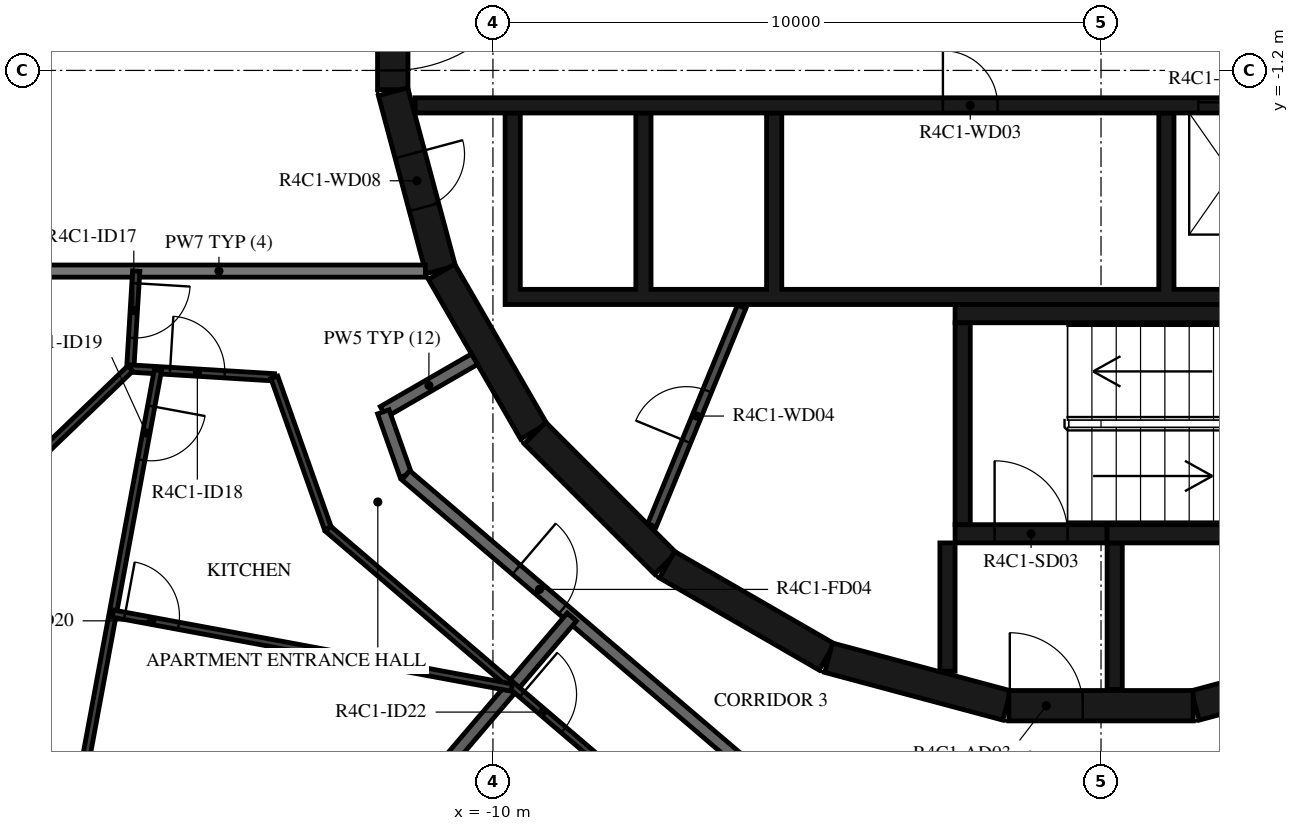
"""IFC4 building model, lengths in metres.
Left out: names, types, materials, properties, quantities, classifications, styles, units other than length and angle.
Written with IfcOpenShell. Run it as: python <this file> out.ifc"""

import sys

from ifc_helpers import new_model, si_unit, direction, frame, frame_2d, origin, place, context, subcontext, project, spatial, polyline, rectangle, outline, extrude, element, fill, save


model = new_model("IFC4")
c1 = context("Model", 3, precision=1e-05, world=origin(), true_north=direction((0.0, 1.0)))
c2 = subcontext(c1, "Body", "Model", "MODEL_VIEW")
j1 = project(units=[si_unit("LENGTHUNIT", "METRE"), si_unit("PLANEANGLEUNIT", "RADIAN")], contexts=[c1])
p1 = place(None, origin())
s1 = spatial("IfcSite", under=j1, at=p1, CompositionType="ELEMENT")
p2 = place(p1, origin())
s2 = spatial("IfcBuilding", under=s1, at=p2, CompositionType="ELEMENT")
p3 = place(p2, frame((0.0, 0.0, 176.2)))
s3 = spatial("IfcBuildingStorey", under=s2, at=p3, CompositionType="ELEMENT", Elevation=176.2)
p4 = place(p3, frame((1.55, -11.643, 0.0), z_axis=(0.0, 0.0, 1.0), x_axis=(0.965948410781, 0.258734743916, 0.0)))
e1 = element("IfcWall", 1, at=p4, inside=s3, PredefinedType="SHEAR", context=c2, shape_type="SweptSolid", body=[
    extrude(rectangle(XDim=3.033, YDim=0.5, at=frame_2d((1.516, 0.0))), origin(), (0.0, 0.0, 1.0), 3.12),
])
p5 = place(p3, frame((-11.647, 1.516, 0.0), z_axis=(0.0, 0.0, 1.0), x_axis=(0.0, -1.0, 0.0)))
e2 = element("IfcWall", 2, at=p5, inside=s3, PredefinedType="SHEAR", context=c2, shape_type="SweptSolid", body=[
    extrude(rectangle(XDim=3.033, YDim=0.5, at=frame_2d((1.516, 0.0))), origin(), (0.0, 0.0, 1.0), 3.12),
])
p6 = place(p5, frame((0.316, 0.0, 0.0)))
e3 = element("IfcOpeningElement", 3, at=p6, cuts=e2, PredefinedType="OPENING", context=c2, shape_type="SweptSolid", body=[
    extrude(rectangle(XDim=2.4, YDim=2.1, at=frame_2d((1.2, 1.05))), frame((0.0, 0.26, 0.0), z_axis=(0.0, -1.0, 0.0), x_axis=(1.0, 0.0, 0.0)), (0.0, 0.0, 1.0), 0.52),
])
p7 = place(p3, frame((-11.643, -1.55, 0.0), z_axis=(0.0, 0.0, 1.0), x_axis=(0.258734743916, -0.965948410781, 0.0)))
e4 = element("IfcWall", 4, at=p7, inside=s3, PredefinedType="SHEAR", context=c2, shape_type="SweptSolid", body=[
    extrude(rectangle(XDim=3.033, YDim=0.5, at=frame_2d((1.516, 0.0))), origin(), (0.0, 0.0, 1.0), 3.12),
])
p8 = place(p7, frame((1.066, 0.0, 0.0)))
e5 = element("IfcOpeningElement", 5, at=p8, cuts=e4, PredefinedType="OPENING", context=c2, shape_type="SweptSolid", body=[
    extrude(rectangle(XDim=0.9, YDim=2.1, at=frame_2d((0.45, 1.05))), frame((0.0, 0.26, 0.0), z_axis=(0.0, -1.0, 0.0), x_axis=(1.0, 0.0, 0.0)), (0.0, 0.0, 1.0), 0.52),
])
p9 = place(p3, frame((-10.845, -4.51, 0.0), z_axis=(0.0, 0.0, 1.0), x_axis=(0.500087131594, -0.865975092491, 0.0)))
e6 = element("IfcWall", 6, at=p9, inside=s3, PredefinedType="SHEAR", context=c2, shape_type="SweptSolid", body=[
    extrude(rectangle(XDim=3.033, YDim=0.5, at=frame_2d((1.516, 0.0))), origin(), (0.0, 0.0, 1.0), 3.12),
])
p10 = place(p3, frame((-9.308, -7.164, 0.0), z_axis=(0.0, 0.0, 1.0), x_axis=(0.707106781187, -0.707106781187, 0.0)))
e7 = element("IfcWall", 7, at=p10, inside=s3, PredefinedType="SHEAR", context=c2, shape_type="SweptSolid", body=[
    extrude(rectangle(XDim=3.032, YDim=0.5, at=frame_2d((1.516, 0.0))), origin(), (0.0, 0.0, 1.0), 3.12),
])
for number, where, z_axis, x_axis in (
    (8, (-7.137, -9.329, 0.0), (0.0, 0.0, 1.0), (0.866, -0.5, 0.0)),
    (9, (-4.479, -10.858, 0.0), (0.0, 0.0, 1.0), (0.966, -0.259, 0.0)),
):
    element("IfcWall", number, at=place(p3, frame(where, z_axis=z_axis, x_axis=x_axis)), inside=s3, PredefinedType="SHEAR", context=c2, shape_type="SweptSolid", body=[
        extrude(rectangle(XDim=3.033, YDim=0.5, at=frame_2d((1.516, 0.0))), origin(), (0.0, 0.0, 1.0), 3.12),
    ])
p11 = place(p3, frame((-1.516, -11.647, 0.0), z_axis=(0.0, 0.0, 1.0), x_axis=(1.0, 0.0, 0.0)))
e10 = element("IfcWall", 10, at=p11, inside=s3, PredefinedType="SHEAR", context=c2, shape_type="SweptSolid", body=[
    extrude(rectangle(XDim=3.033, YDim=0.5, at=frame_2d((1.516, 0.0))), origin(), (0.0, 0.0, 1.0), 3.12),
])
p12 = place(p11, frame((0.016, 0.0, 0.0)))
e11 = element("IfcOpeningElement", 11, at=p12, cuts=e10, PredefinedType="OPENING", context=c2, shape_type="SweptSolid", body=[
    extrude(rectangle(XDim=1.2, YDim=2.1, at=frame_2d((0.6, 1.05))), frame((0.0, 0.26, 0.0), z_axis=(0.0, -1.0, 0.0), x_axis=(1.0, 0.0, 0.0)), (0.0, 0.0, 1.0), 0.52),
])
p13 = place(p3, frame((-2.275, -8.67, 0.0), z_axis=(0.0, 0.0, 1.0), x_axis=(0.0, 1.0, 0.0)))
e12 = element("IfcWall", 12, at=p13, inside=s3, PredefinedType="SHEAR", context=c2, shape_type="SweptSolid", body=[
    extrude(rectangle(XDim=3.32, YDim=0.25, at=frame_2d((1.66, 0.0))), origin(), (0.0, 0.0, 1.0), 3.12),
])
p14 = place(p3, frame((-2.4, -5.2, 0.0), z_axis=(0.0, 0.0, 1.0), x_axis=(1.0, 0.0, 0.0)))
e13 = element("IfcWall", 13, at=p14, inside=s3, PredefinedType="SHEAR", context=c2, shape_type="SweptSolid", body=[
    extrude(rectangle(XDim=7.05, YDim=0.3, at=frame_2d((3.525, 0.0))), origin(), (0.0, 0.0, 1.0), 3.12),
])
p15 = place(p3, frame((0.1, -8.82, 0.0), z_axis=(0.0, 0.0, 1.0), x_axis=(1.0, 0.0, 0.0)))
e14 = element("IfcWall", 14, at=p15, inside=s3, PredefinedType="SHEAR", context=c2, shape_type="SweptSolid", body=[
    extrude(rectangle(XDim=4.55, YDim=0.3, at=frame_2d((2.275, 0.0))), origin(), (0.0, 0.0, 1.0), 3.12),
])
p16 = place(p3, frame((-2.4, -8.82, 0.0), z_axis=(0.0, 0.0, 1.0), x_axis=(1.0, 0.0, 0.0)))
e15 = element("IfcWall", 15, at=p16, inside=s3, PredefinedType="SHEAR", context=c2, shape_type="SweptSolid", body=[
    extrude(rectangle(XDim=2.5, YDim=0.3, at=frame_2d((1.25, 0.0))), origin(), (0.0, 0.0, 1.0), 3.12),
])
p17 = place(p16, frame((0.65, 0.0, 0.0)))
e16 = element("IfcOpeningElement", 16, at=p17, cuts=e15, PredefinedType="OPENING", context=c2, shape_type="SweptSolid", body=[
    extrude(rectangle(XDim=1.2, YDim=2.1, at=frame_2d((0.6, 1.05))), frame((0.0, 0.16, 0.0), z_axis=(0.0, -1.0, 0.0), x_axis=(1.0, 0.0, 0.0)), (0.0, 0.0, 1.0), 0.32),
])
p18 = place(p3, frame((-2.525, -8.97, 0.0), z_axis=(0.0, 0.0, 1.0), x_axis=(0.0, -1.0, 0.0)))
e17 = element("IfcWall", 17, at=p18, inside=s3, PredefinedType="SHEAR", context=c2, shape_type="SweptSolid", body=[
    extrude(rectangle(XDim=2.11, YDim=0.25, at=frame_2d((1.055, 0.0))), origin(), (0.0, 0.0, 1.0), 3.12),
])
p19 = place(p3, frame((0.225, -8.97, 0.0), z_axis=(0.0, 0.0, 1.0), x_axis=(0.0, -1.0, 0.0)))
e18 = element("IfcWall", 18, at=p19, inside=s3, PredefinedType="SHEAR", context=c2, shape_type="SweptSolid", body=[
    extrude(rectangle(XDim=2.41, YDim=0.25, at=frame_2d((1.205, 0.0))), origin(), (0.0, 0.0, 1.0), 3.12),
])
p20 = place(p3, origin())
e19 = element("IfcWall", 19, at=p20, inside=s3, PredefinedType="SHEAR", context=c2, shape_type="SweptSolid", body=[
    extrude(outline(polyline([(9.8, -5.05), (9.8, -4.8), (9.8, -1.9), (9.55, -1.9), (9.55, -4.8), (7.65, -4.8), (7.65, -1.9), (7.4, -1.9), (7.4, -4.8), (5.5, -4.8), (5.5, -1.9), (5.25, -1.9), (5.25, -4.8), (3.35, -4.8), (3.35, -1.9), (3.1, -1.9), (3.1, -4.8), (1.2, -4.8), (1.2, -1.9), (0.95, -1.9), (0.95, -4.8), (-5.25, -4.8), (-5.25, -1.9), (-5.5, -1.9), (-5.5, -4.8), (-7.4, -4.8), (-7.4, -1.9), (-7.65, -1.9), (-7.65, -4.8), (-9.55, -4.8), (-9.55, -1.9), (-9.8, -1.9), (-9.8, -4.8), (-9.8, -5.05), (9.8, -5.05)])), origin(), (0.0, 0.0, 1.0), 3.12),
])
p21 = place(p3, frame((-11.28, -1.775, 0.0), z_axis=(0.0, 0.0, 1.0), x_axis=(1.0, 0.0, 0.0)))
e20 = element("IfcWall", 20, at=p21, inside=s3, PredefinedType="SHEAR", context=c2, shape_type="SweptSolid", body=[
    extrude(rectangle(XDim=14.38, YDim=0.25, at=frame_2d((7.19, 0.0))), origin(), (0.0, 0.0, 1.0), 3.12),
])
p22 = place(p21, frame((12.88, 0.0, 0.0)))
e21 = element("IfcOpeningElement", 21, at=p22, cuts=e20, PredefinedType="OPENING", context=c2, shape_type="SweptSolid", body=[
    extrude(rectangle(XDim=1.1, YDim=2.1, at=frame_2d((0.55, 1.05))), frame((0.0, 0.135, 0.0), z_axis=(0.0, -1.0, 0.0), x_axis=(1.0, 0.0, 0.0)), (0.0, 0.0, 1.0), 0.27),
])
p23 = place(p21, frame((8.68, 0.0, 0.0)))
e22 = element("IfcOpeningElement", 22, at=p23, cuts=e20, PredefinedType="OPENING", context=c2, shape_type="SweptSolid", body=[
    extrude(rectangle(XDim=0.9, YDim=2.1, at=frame_2d((0.45, 1.05))), frame((0.0, 0.135, 0.0), z_axis=(0.0, -1.0, 0.0), x_axis=(1.0, 0.0, 0.0)), (0.0, 0.0, 1.0), 0.27),
])
p24 = place(p3, frame((-7.385, -8.681, 0.0), z_axis=(0.0, 0.0, 1.0), x_axis=(0.379804590409, 0.925066739811, 0.0)))
e23 = element("IfcWall", 23, at=p24, inside=s3, PredefinedType="PARTITIONING", context=c2, shape_type="SweptSolid", body=[
    extrude(rectangle(XDim=3.885, YDim=0.15, at=frame_2d((1.942, 0.0))), origin(), (0.0, 0.0, 1.0), 3.12),
])
p25 = place(p24, frame((1.493, 0.0, 0.0)))
e24 = element("IfcOpeningElement", 24, at=p25, cuts=e23, PredefinedType="OPENING", context=c2, shape_type="SweptSolid", body=[
    extrude(rectangle(XDim=0.9, YDim=2.1, at=frame_2d((0.45, 1.05))), frame((0.0, 0.085, 0.0), z_axis=(0.0, -1.0, 0.0), x_axis=(1.0, 0.0, 0.0)), (0.0, 0.0, 1.0), 0.17),
])
p26 = place(p3, frame((-10.303, -5.949, 0.0), z_axis=(0.0, 0.0, 1.0), x_axis=(-0.866021168401, -0.500007335828, 0.0)))
e25 = element("IfcWall", 25, at=p26, inside=s3, PredefinedType="STANDARD", context=c2, shape_type="SweptSolid", body=[
    extrude(rectangle(XDim=1.731, YDim=0.2, at=frame_2d((0.865, 0.0))), origin(), (0.0, 0.0, 1.0), 3.12),
])
p27 = place(p3, frame((-11.802, -6.814, 0.0), z_axis=(0.0, 0.0, 1.0), x_axis=(0.333904297771, -0.942606980629, 0.0)))
e26 = element("IfcWall", 26, at=p27, inside=s3, PredefinedType="STANDARD", context=c2, shape_type="SweptSolid", body=[
    extrude(rectangle(XDim=1.107, YDim=0.2, at=frame_2d((0.553, 0.0))), origin(), (0.0, 0.0, 1.0), 3.12),
])
p28 = place(p3, frame((-11.433, -7.858, 0.0), z_axis=(0.0, 0.0, 1.0), x_axis=(0.760412154545, -0.649440801937, 0.0)))
e27 = element("IfcWall", 27, at=p28, inside=s3, PredefinedType="STANDARD", context=c2, shape_type="SweptSolid", body=[
    extrude(rectangle(XDim=7.181, YDim=0.2, at=frame_2d((3.59, 0.0))), origin(), (0.0, 0.0, 1.0), 3.12),
])
p29 = place(p28, frame((2.39, 0.0, 0.0)))
e28 = element("IfcOpeningElement", 28, at=p29, cuts=e27, PredefinedType="OPENING", context=c2, shape_type="SweptSolid", body=[
    extrude(rectangle(XDim=1.0, YDim=2.1, at=frame_2d((0.5, 1.05))), frame((0.0, 0.11, 0.0), z_axis=(0.0, -1.0, 0.0), x_axis=(1.0, 0.0, 0.0)), (0.0, 0.0, 1.0), 0.22),
])
p30 = place(p3, frame((1.088, -13.83, 0.0), z_axis=(0.0, 0.0, 1.0), x_axis=(0.942648397945, 0.333787354241, 0.0)))
e29 = element("IfcWall", 29, at=p30, inside=s3, PredefinedType="STANDARD", context=c2, shape_type="SweptSolid", body=[
    extrude(rectangle(XDim=7.181, YDim=0.2, at=frame_2d((3.591, 0.0))), origin(), (0.0, 0.0, 1.0), 3.12),
])
p31 = place(p30, frame((0.2, 0.0, 0.0)))
e30 = element("IfcOpeningElement", 30, at=p31, cuts=e29, PredefinedType="OPENING", context=c2, shape_type="SweptSolid", body=[
    extrude(rectangle(XDim=1.0, YDim=2.1, at=frame_2d((0.5, 1.05))), frame((0.0, 0.11, 0.0), z_axis=(0.0, -1.0, 0.0), x_axis=(1.0, 0.0, 0.0)), (0.0, 0.0, 1.0), 0.22),
])
p32 = place(p3, frame((-17.9, -4.5, 0.0), z_axis=(0.0, 0.0, 1.0), x_axis=(1.0, 0.0, 0.0)))
e31 = element("IfcWall", 31, at=p32, inside=s3, PredefinedType="STANDARD", context=c2, shape_type="SweptSolid", body=[
    extrude(rectangle(XDim=6.789, YDim=0.2, at=frame_2d((3.394, 0.0))), origin(), (0.0, 0.0, 1.0), 3.12),
])
p33 = place(p3, frame((-11.838, -13.86, 0.0), z_axis=(0.0, 0.0, 1.0), x_axis=(0.64944503311, 0.760408540831, 0.0)))
e32 = element("IfcWall", 32, at=p33, inside=s3, PredefinedType="STANDARD", context=c2, shape_type="SweptSolid", body=[
    extrude(rectangle(XDim=4.827, YDim=0.2, at=frame_2d((2.414, 0.0))), origin(), (0.0, 0.0, 1.0), 3.12),
])
p34 = place(p3, frame((-15.866, -4.5, 0.0), z_axis=(0.0, 0.0, 1.0), x_axis=(-0.060986374837, -0.998138598635, 0.0)))
e33 = element("IfcWall", 33, at=p34, inside=s3, PredefinedType="PARTITIONING", context=c2, shape_type="SweptSolid", body=[
    extrude(rectangle(XDim=1.605, YDim=0.12, at=frame_2d((0.803, 0.0))), origin(), (0.0, 0.0, 1.0), 3.12),
])
p35 = place(p34, frame((0.2, 0.0, 0.0)))
e34 = element("IfcOpeningElement", 34, at=p35, cuts=e33, PredefinedType="OPENING", context=c2, shape_type="SweptSolid", body=[
    extrude(rectangle(XDim=0.9, YDim=2.1, at=frame_2d((0.45, 1.05))), frame((0.0, 0.07, 0.0), z_axis=(0.0, -1.0, 0.0), x_axis=(1.0, 0.0, 0.0)), (0.0, 0.0, 1.0), 0.14),
])
p36 = place(p3, frame((-15.964, -6.102, 0.0), z_axis=(0.0, 0.0, 1.0), x_axis=(0.998145469708, -0.060873814574, 0.0)))
e35 = element("IfcWall", 35, at=p36, inside=s3, PredefinedType="PARTITIONING", context=c2, shape_type="SweptSolid", body=[
    extrude(rectangle(XDim=2.374, YDim=0.12, at=frame_2d((1.187, 0.0))), origin(), (0.0, 0.0, 1.0), 3.12),
])
p37 = place(p36, frame((0.656, 0.0, 0.0)))
e36 = element("IfcOpeningElement", 36, at=p37, cuts=e35, PredefinedType="OPENING", context=c2, shape_type="SweptSolid", body=[
    extrude(rectangle(XDim=0.9, YDim=2.1, at=frame_2d((0.45, 1.05))), frame((0.0, 0.07, 0.0), z_axis=(0.0, -1.0, 0.0), x_axis=(1.0, 0.0, 0.0)), (0.0, 0.0, 1.0), 0.14),
])
p38 = place(p3, frame((-13.594, -6.247, 0.0), z_axis=(0.0, 0.0, 1.0), x_axis=(0.333777006894, -0.942652061828, 0.0)))
e37 = element("IfcWall", 37, at=p38, inside=s3, PredefinedType="PARTITIONING", context=c2, shape_type="SweptSolid", body=[
    extrude(rectangle(XDim=2.642, YDim=0.12, at=frame_2d((1.321, 0.0))), origin(), (0.0, 0.0, 1.0), 3.12),
])
p39 = place(p3, frame((-12.713, -8.737, 0.0), z_axis=(0.0, 0.0, 1.0), x_axis=(0.760432387723, -0.649417110725, 0.0)))
e38 = element("IfcWall", 38, at=p39, inside=s3, PredefinedType="PARTITIONING", context=c2, shape_type="SweptSolid", body=[
    extrude(rectangle(XDim=6.032, YDim=0.12, at=frame_2d((3.016, 0.0))), origin(), (0.0, 0.0, 1.0), 3.12),
])
p40 = place(p39, frame((4.192, 0.0, 0.0)))
e39 = element("IfcOpeningElement", 39, at=p40, cuts=e38, PredefinedType="OPENING", context=c2, shape_type="SweptSolid", body=[
    extrude(rectangle(XDim=0.9, YDim=2.1, at=frame_2d((0.45, 1.05))), frame((0.0, 0.07, 0.0), z_axis=(0.0, -1.0, 0.0), x_axis=(1.0, 0.0, 0.0)), (0.0, 0.0, 1.0), 0.14),
])
p41 = place(p3, frame((-20.849, -10.792, 0.0), z_axis=(0.0, 0.0, 1.0), x_axis=(0.721364983662, 0.692555095531, 0.0)))
e40 = element("IfcWall", 40, at=p41, inside=s3, PredefinedType="PARTITIONING", context=c2, shape_type="SweptSolid", body=[
    extrude(rectangle(XDim=6.771, YDim=0.12, at=frame_2d((3.385, 0.0))), origin(), (0.0, 0.0, 1.0), 3.12),
])
p42 = place(p3, frame((-15.51, -6.13, 0.0), z_axis=(0.0, 0.0, 1.0), x_axis=(-0.182243361628, -0.98325345519, 0.0)))
e41 = element("IfcWall", 41, at=p42, inside=s3, PredefinedType="PARTITIONING", context=c2, shape_type="SweptSolid", body=[
    extrude(rectangle(XDim=9.134, YDim=0.12, at=frame_2d((4.567, 0.0))), origin(), (0.0, 0.0, 1.0), 3.12),
])
p43 = place(p42, frame((0.6, 0.0, 0.0)))
e42 = element("IfcOpeningElement", 42, at=p43, cuts=e41, PredefinedType="OPENING", context=c2, shape_type="SweptSolid", body=[
    extrude(rectangle(XDim=0.9, YDim=2.1, at=frame_2d((0.45, 1.05))), frame((0.0, 0.07, 0.0), z_axis=(0.0, -1.0, 0.0), x_axis=(1.0, 0.0, 0.0)), (0.0, 0.0, 1.0), 0.14),
])
p44 = place(p3, frame((-16.252, -10.133, 0.0), z_axis=(0.0, 0.0, 1.0), x_axis=(0.983256998026, -0.182224246005, 0.0)))
e43 = element("IfcWall", 43, at=p44, inside=s3, PredefinedType="PARTITIONING", context=c2, shape_type="SweptSolid", body=[
    extrude(rectangle(XDim=6.671, YDim=0.12, at=frame_2d((3.335, 0.0))), origin(), (0.0, 0.0, 1.0), 3.12),
])
p45 = place(p44, frame((0.2, 0.0, 0.0)))
e44 = element("IfcOpeningElement", 44, at=p45, cuts=e43, PredefinedType="OPENING", context=c2, shape_type="SweptSolid", body=[
    extrude(rectangle(XDim=0.9, YDim=2.1, at=frame_2d((0.45, 1.05))), frame((0.0, 0.07, 0.0), z_axis=(0.0, -1.0, 0.0), x_axis=(1.0, 0.0, 0.0)), (0.0, 0.0, 1.0), 0.14),
])
p46 = place(p17, origin())
e45 = element("IfcDoor", 45, at=p46, inside=s3, OperationType="SINGLE_SWING_LEFT", PredefinedType="DOOR", context=c2, shape_type="SweptSolid", body=[
    extrude(rectangle(XDim=1.2, YDim=2.1, at=frame_2d((0.6, 1.05))), frame((0.0, 0.025, 0.0), z_axis=(0.0, -1.0, 0.0), x_axis=(1.0, 0.0, 0.0)), (0.0, 0.0, 1.0), 0.05),
])
fill(e16, e45)
p47 = place(p12, origin())
e46 = element("IfcDoor", 46, at=p47, inside=s3, OperationType="SINGLE_SWING_RIGHT", PredefinedType="DOOR", context=c2, shape_type="SweptSolid", body=[
    extrude(rectangle(XDim=1.2, YDim=2.1, at=frame_2d((0.6, 1.05))), frame((0.0, 0.025, 0.0), z_axis=(0.0, -1.0, 0.0), x_axis=(1.0, 0.0, 0.0)), (0.0, 0.0, 1.0), 0.05),
])
fill(e11, e46)
p48 = place(p6, origin())
e47 = element("IfcDoor", 47, at=p48, inside=s3, OperationType="DOUBLE_DOOR_SINGLE_SWING", PredefinedType="DOOR", context=c2, shape_type="SweptSolid", body=[
    extrude(rectangle(XDim=2.4, YDim=2.1, at=frame_2d((1.2, 1.05))), frame((0.0, 0.025, 0.0), z_axis=(0.0, -1.0, 0.0), x_axis=(1.0, 0.0, 0.0)), (0.0, 0.0, 1.0), 0.05),
])
fill(e3, e47)
p49 = place(p22, origin())
e48 = element("IfcDoor", 48, at=p49, inside=s3, OperationType="DOUBLE_DOOR_SLIDING", PredefinedType="DOOR", context=c2, shape_type="SweptSolid", body=[
    extrude(rectangle(XDim=1.1, YDim=2.1, at=frame_2d((0.55, 1.05))), frame((0.0, 0.025, 0.0), z_axis=(0.0, -1.0, 0.0), x_axis=(1.0, 0.0, 0.0)), (0.0, 0.0, 1.0), 0.05),
])
fill(e21, e48)
p50 = place(p23, origin())
e49 = element("IfcDoor", 49, at=p50, inside=s3, OperationType="SINGLE_SWING_LEFT", PredefinedType="DOOR", context=c2, shape_type="SweptSolid", body=[
    extrude(rectangle(XDim=0.9, YDim=2.1, at=frame_2d((0.45, 1.05))), frame((0.0, 0.025, 0.0), z_axis=(0.0, -1.0, 0.0), x_axis=(1.0, 0.0, 0.0)), (0.0, 0.0, 1.0), 0.05),
])
fill(e22, e49)
p51 = place(p25, origin())
e50 = element("IfcDoor", 50, at=p51, inside=s3, OperationType="SINGLE_SWING_RIGHT", PredefinedType="DOOR", context=c2, shape_type="SweptSolid", body=[
    extrude(rectangle(XDim=0.9, YDim=2.1, at=frame_2d((0.45, 1.05))), frame((0.0, 0.025, 0.0), z_axis=(0.0, -1.0, 0.0), x_axis=(1.0, 0.0, 0.0)), (0.0, 0.0, 1.0), 0.05),
])
fill(e24, e50)
p52 = place(p8, origin())
e51 = element("IfcDoor", 51, at=p52, inside=s3, OperationType="SINGLE_SWING_RIGHT", PredefinedType="DOOR", context=c2, shape_type="SweptSolid", body=[
    extrude(rectangle(XDim=0.9, YDim=2.1, at=frame_2d((0.45, 1.05))), frame((0.0, 0.025, 0.0), z_axis=(0.0, -1.0, 0.0), x_axis=(1.0, 0.0, 0.0)), (0.0, 0.0, 1.0), 0.05),
])
fill(e5, e51)
p53 = place(p29, origin())
e52 = element("IfcDoor", 52, at=p53, inside=s3, OperationType="SINGLE_SWING_RIGHT", PredefinedType="DOOR", context=c2, shape_type="SweptSolid", body=[
    extrude(rectangle(XDim=1.0, YDim=2.1, at=frame_2d((0.5, 1.05))), frame((0.0, 0.025, 0.0), z_axis=(0.0, -1.0, 0.0), x_axis=(1.0, 0.0, 0.0)), (0.0, 0.0, 1.0), 0.05),
])
fill(e28, e52)
p54 = place(p35, origin())
e53 = element("IfcDoor", 53, at=p54, inside=s3, OperationType="SINGLE_SWING_RIGHT", PredefinedType="DOOR", context=c2, shape_type="SweptSolid", body=[
    extrude(rectangle(XDim=0.9, YDim=2.1, at=frame_2d((0.45, 1.05))), frame((0.0, 0.025, 0.0), z_axis=(0.0, -1.0, 0.0), x_axis=(1.0, 0.0, 0.0)), (0.0, 0.0, 1.0), 0.05),
])
fill(e34, e53)
p55 = place(p37, origin())
e54 = element("IfcDoor", 54, at=p55, inside=s3, OperationType="SINGLE_SWING_RIGHT", PredefinedType="DOOR", context=c2, shape_type="SweptSolid", body=[
    extrude(rectangle(XDim=0.9, YDim=2.1, at=frame_2d((0.45, 1.05))), frame((0.0, 0.025, 0.0), z_axis=(0.0, -1.0, 0.0), x_axis=(1.0, 0.0, 0.0)), (0.0, 0.0, 1.0), 0.05),
])
fill(e36, e54)
p56 = place(p43, origin())
e55 = element("IfcDoor", 55, at=p56, inside=s3, OperationType="SINGLE_SWING_RIGHT", PredefinedType="DOOR", context=c2, shape_type="SweptSolid", body=[
    extrude(rectangle(XDim=0.9, YDim=2.1, at=frame_2d((0.45, 1.05))), frame((0.0, 0.025, 0.0), z_axis=(0.0, -1.0, 0.0), x_axis=(1.0, 0.0, 0.0)), (0.0, 0.0, 1.0), 0.05),
])
fill(e42, e55)
p57 = place(p45, origin())
e56 = element("IfcDoor", 56, at=p57, inside=s3, OperationType="SINGLE_SWING_RIGHT", PredefinedType="DOOR", context=c2, shape_type="SweptSolid", body=[
    extrude(rectangle(XDim=0.9, YDim=2.1, at=frame_2d((0.45, 1.05))), frame((0.0, 0.025, 0.0), z_axis=(0.0, -1.0, 0.0), x_axis=(1.0, 0.0, 0.0)), (0.0, 0.0, 1.0), 0.05),
])
fill(e44, e56)
p58 = place(p40, origin())
e57 = element("IfcDoor", 57, at=p58, inside=s3, OperationType="SINGLE_SWING_LEFT", PredefinedType="DOOR", context=c2, shape_type="SweptSolid", body=[
    extrude(rectangle(XDim=0.9, YDim=2.1, at=frame_2d((0.45, 1.05))), frame((0.0, 0.025, 0.0), z_axis=(0.0, -1.0, 0.0), x_axis=(1.0, 0.0, 0.0)), (0.0, 0.0, 1.0), 0.05),
])
fill(e39, e57)
save(model, sys.argv[1])
